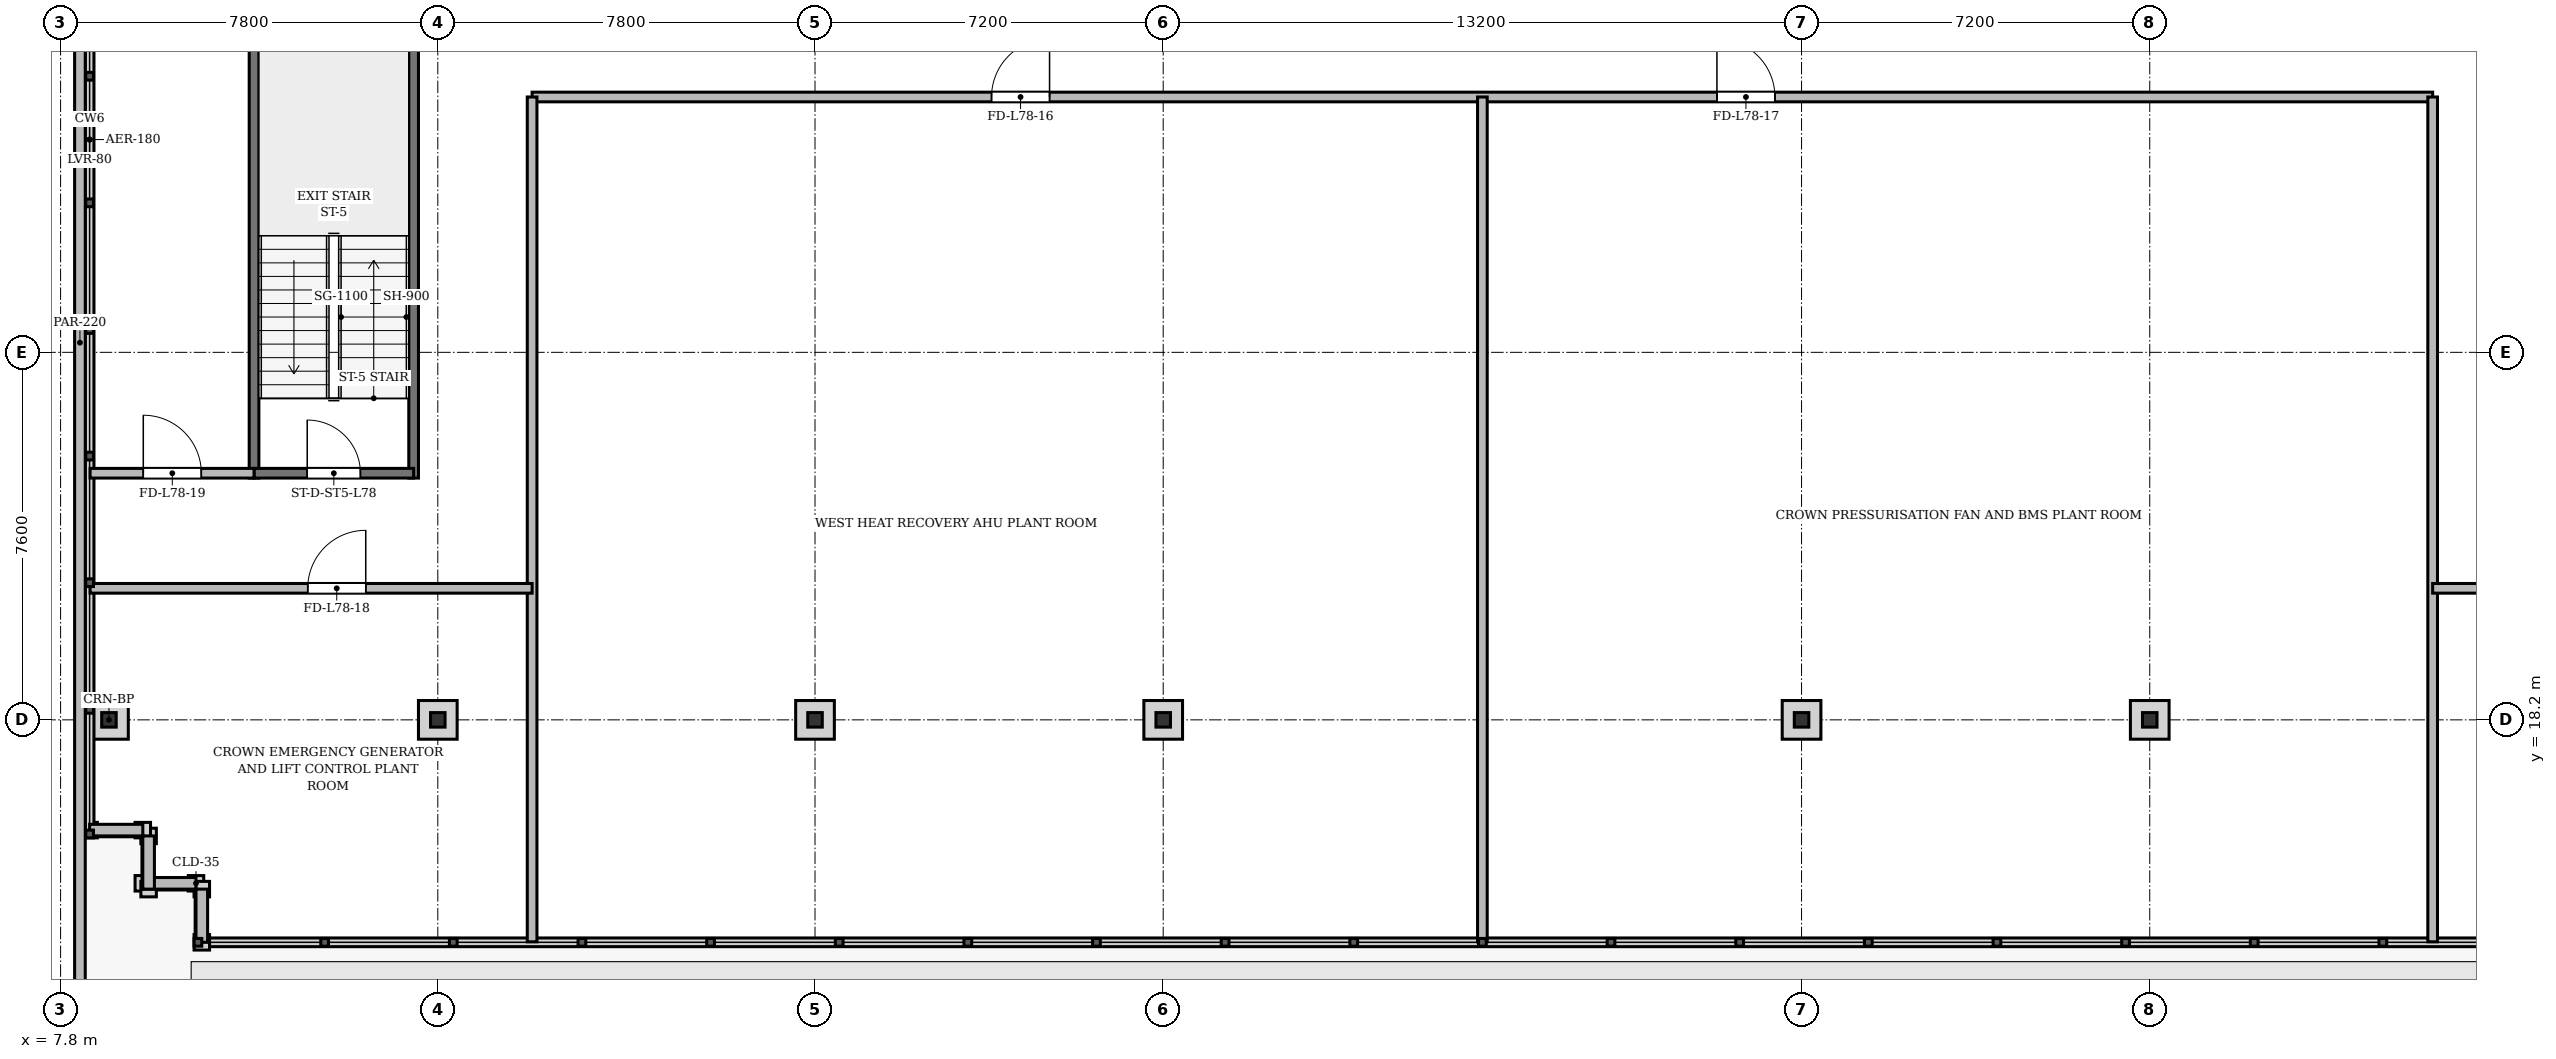
"""IFC4 building model, lengths in metres.
Left out: names, types, materials, properties, quantities, classifications, styles, units other than length and angle.
Written with IfcOpenShell. Run it as: python <this file> out.ifc"""

import sys

from ifc_helpers import new_model, si_unit, direction, frame, frame_2d, origin, origin_2d, place, context, subcontext, project, spatial, rectangle, i_section, extrude, source, transform, mapped, element, fill, save


model = new_model("IFC4")
c1 = context("Model", 3, precision=1e-05, world=origin(), true_north=direction((0.0, 1.0)))
c2 = subcontext(c1, "Body", "Model", "MODEL_VIEW")
j1 = project(units=[si_unit("LENGTHUNIT", "METRE"), si_unit("PLANEANGLEUNIT", "RADIAN")], contexts=[c1])
p1 = place(None, origin())
s1 = spatial("IfcSite", under=j1, at=p1, CompositionType="ELEMENT")
p2 = place(p1, origin())
s2 = spatial("IfcBuilding", under=s1, at=p2, CompositionType="ELEMENT")
p3 = place(p2, frame((0.0, 0.0, 299.1)))
s3 = spatial("IfcBuildingStorey", under=s2, at=p3, CompositionType="ELEMENT", Elevation=299.1)
m1 = source(origin(), c2, "Body", "SweptSolid", [
    extrude(i_section(OverallWidth=0.3, OverallDepth=0.3, WebThickness=0.015, FlangeThickness=0.024, at=origin_2d()), origin(), (0.0, 0.0, 1.0), 4.4),
])
for number, where, z_axis, x_axis in (
    (1, (8.8, 18.2, 0.0), (0.0, 0.0, 1.0), (1.0, 0.0, 0.0)),
    (2, (15.6, 18.2, 0.0), (0.0, 0.0, 1.0), (1.0, 0.0, 0.0)),
    (3, (23.4, 18.2, 0.0), (0.0, 0.0, 1.0), (1.0, 0.0, 0.0)),
    (4, (30.6, 18.2, 0.0), (0.0, 0.0, 1.0), (1.0, 0.0, 0.0)),
    (5, (43.8, 18.2, 0.0), (0.0, 0.0, 1.0), (1.0, 0.0, 0.0)),
    (6, (51.0, 18.2, 0.0), (0.0, 0.0, 1.0), (1.0, 0.0, 0.0)),
):
    element("IfcColumn", number, at=place(p3, frame(where, z_axis=z_axis, x_axis=x_axis)), inside=s3, PredefinedType="COLUMN", context=c2, shape_type="MappedRepresentation", body=[
        mapped(m1, transform((0.0, 0.0, 0.0), x_axis=(1.0, 0.0, 0.0), y_axis=(0.0, 1.0, 0.0), z_axis=(0.0, 0.0, 1.0), scale=1.0)),
    ])
for number, where, z_axis, x_axis in (
    (7, (10.6, 14.82, 0.0), (0.0, 0.0, 1.0), (-1.0, 0.0, 0.0)),
    (8, (9.62, 14.7, 0.0), (0.0, 0.0, 1.0), (0.0, 1.0, 0.0)),
    (9, (9.5, 15.92, 0.0), (0.0, 0.0, 1.0), (-1.0, 0.0, 0.0)),
):
    element("IfcWall", number, at=place(p3, frame(where, z_axis=z_axis, x_axis=x_axis)), inside=s3, PredefinedType="SOLIDWALL", context=c2, shape_type="SweptSolid", body=[
        extrude(rectangle(XDim=1.1, YDim=0.24, at=frame_2d((0.55, 0.0))), origin(), (0.0, 0.0, 1.0), 4.12),
    ])
p4 = place(p3, frame((10.72, 13.6, 0.0), z_axis=(0.0, 0.0, 1.0), x_axis=(0.0, 1.0, 0.0)))
e10 = element("IfcWall", 10, at=p4, inside=s3, PredefinedType="SOLIDWALL", context=c2, shape_type="SweptSolid", body=[
    extrude(rectangle(XDim=1.1, YDim=0.24, at=frame_2d((0.55, 0.0))), origin(), (0.0, 0.0, 1.0), 4.12),
])
p5 = place(p3, frame((8.2, 45.5, 0.0), z_axis=(0.0, 0.0, 1.0), x_axis=(0.0, -1.0, 0.0)))
e11 = element("IfcWall", 11, at=p5, inside=s3, PredefinedType="PARAPET", context=c2, shape_type="SweptSolid", body=[
    extrude(rectangle(XDim=39.0, YDim=0.22, at=frame_2d((19.5, 0.0))), origin(), (0.0, 0.0, 1.0), 1.08),
])
for number, where, z_axis, x_axis in (
    (12, (11.8, 23.2, 0.0), (0.0, 0.0, 1.0), (0.0, 1.0, 0.0)),
    (13, (15.1, 23.2, 0.0), (0.0, 0.0, 1.0), (0.0, 1.0, 0.0)),
):
    element("IfcWall", number, at=place(p3, frame(where, z_axis=z_axis, x_axis=x_axis)), inside=s3, PredefinedType="SHEAR", context=c2, shape_type="SweptSolid", body=[
        extrude(rectangle(XDim=10.0, YDim=0.2, at=frame_2d((5.0, 0.0))), origin(), (0.0, 0.0, 1.0), 4.12),
    ])
p6 = place(p3, frame((11.8, 23.3, 0.0), z_axis=(0.0, 0.0, 1.0), x_axis=(1.0, 0.0, 0.0)))
e14 = element("IfcWall", 14, at=p6, inside=s3, PredefinedType="SHEAR", context=c2, shape_type="SweptSolid", body=[
    extrude(rectangle(XDim=3.3, YDim=0.2, at=frame_2d((1.65, 0.0))), origin(), (0.0, 0.0, 1.0), 4.12),
])
p7 = place(p6, frame((1.1, 0.0, 0.0)))
e15 = element("IfcOpeningElement", 15, at=p7, cuts=e14, PredefinedType="OPENING", context=c2, shape_type="SweptSolid", body=[
    extrude(rectangle(XDim=1.1, YDim=2.15, at=frame_2d((0.55, 1.075))), frame((0.0, 0.11, 0.0), z_axis=(0.0, -1.0, 0.0), x_axis=(1.0, 0.0, 0.0)), (0.0, 0.0, 1.0), 0.22),
])
p8 = place(p3, frame((17.55, 31.08, 0.0), z_axis=(0.0, 0.0, 1.0), x_axis=(1.0, 0.0, 0.0)))
e16 = element("IfcWall", 16, at=p8, inside=s3, PredefinedType="PARTITIONING", context=c2, shape_type="SweptSolid", body=[
    extrude(rectangle(XDim=39.3, YDim=0.2, at=frame_2d((19.65, 0.0))), origin(), (0.0, 0.0, 1.0), 3.62),
])
p9 = place(p8, frame((9.5, 0.0, 0.0)))
e17 = element("IfcOpeningElement", 17, at=p9, cuts=e16, PredefinedType="OPENING", context=c2, shape_type="SweptSolid", body=[
    extrude(rectangle(XDim=1.2, YDim=2.15, at=frame_2d((0.6, 1.075))), frame((0.0, 0.11, 0.0), z_axis=(0.0, -1.0, 0.0), x_axis=(1.0, 0.0, 0.0)), (0.0, 0.0, 1.0), 0.22),
])
p10 = place(p8, frame((24.5, 0.0, 0.0)))
e18 = element("IfcOpeningElement", 18, at=p10, cuts=e16, PredefinedType="OPENING", context=c2, shape_type="SweptSolid", body=[
    extrude(rectangle(XDim=1.2, YDim=2.15, at=frame_2d((0.6, 1.075))), frame((0.0, 0.11, 0.0), z_axis=(0.0, -1.0, 0.0), x_axis=(1.0, 0.0, 0.0)), (0.0, 0.0, 1.0), 0.22),
])
p11 = place(p3, frame((37.2, 13.61, 0.0), z_axis=(0.0, 0.0, 1.0), x_axis=(0.0, 1.0, 0.0)))
e19 = element("IfcWall", 19, at=p11, inside=s3, PredefinedType="PARTITIONING", context=c2, shape_type="SweptSolid", body=[
    extrude(rectangle(XDim=17.47, YDim=0.2, at=frame_2d((8.735, 0.0))), origin(), (0.0, 0.0, 1.0), 4.12),
])
p12 = place(p3, frame((17.55, 13.61, 0.0), z_axis=(0.0, 0.0, 1.0), x_axis=(0.0, 1.0, 0.0)))
e20 = element("IfcWall", 20, at=p12, inside=s3, PredefinedType="PARTITIONING", context=c2, shape_type="SweptSolid", body=[
    extrude(rectangle(XDim=17.47, YDim=0.2, at=frame_2d((8.735, 0.0))), origin(), (0.0, 0.0, 1.0), 3.62),
])
p13 = place(p3, frame((8.41, 20.92, 0.0), z_axis=(0.0, 0.0, 1.0), x_axis=(1.0, 0.0, 0.0)))
e21 = element("IfcWall", 21, at=p13, inside=s3, PredefinedType="PARTITIONING", context=c2, shape_type="SweptSolid", body=[
    extrude(rectangle(XDim=9.14, YDim=0.2, at=frame_2d((4.57, 0.0))), origin(), (0.0, 0.0, 1.0), 3.62),
])
p14 = place(p13, frame((4.5, 0.0, 0.0)))
e22 = element("IfcOpeningElement", 22, at=p14, cuts=e21, PredefinedType="OPENING", context=c2, shape_type="SweptSolid", body=[
    extrude(rectangle(XDim=1.2, YDim=2.15, at=frame_2d((0.6, 1.075))), frame((0.0, 0.11, 0.0), z_axis=(0.0, -1.0, 0.0), x_axis=(1.0, 0.0, 0.0)), (0.0, 0.0, 1.0), 0.22),
])
p15 = place(p3, frame((8.41, 23.3, 0.0), z_axis=(0.0, 0.0, 1.0), x_axis=(1.0, 0.0, 0.0)))
e23 = element("IfcWall", 23, at=p15, inside=s3, PredefinedType="PARTITIONING", context=c2, shape_type="SweptSolid", body=[
    extrude(rectangle(XDim=3.39, YDim=0.2, at=frame_2d((1.695, 0.0))), origin(), (0.0, 0.0, 1.0), 3.62),
])
p16 = place(p15, frame((1.1, 0.0, 0.0)))
e24 = element("IfcOpeningElement", 24, at=p16, cuts=e23, PredefinedType="OPENING", context=c2, shape_type="SweptSolid", body=[
    extrude(rectangle(XDim=1.2, YDim=2.15, at=frame_2d((0.6, 1.075))), frame((0.0, 0.11, 0.0), z_axis=(0.0, -1.0, 0.0), x_axis=(1.0, 0.0, 0.0)), (0.0, 0.0, 1.0), 0.22),
])
p17 = place(p3, frame((56.85, 13.61, 0.0), z_axis=(0.0, 0.0, 1.0), x_axis=(0.0, 1.0, 0.0)))
e25 = element("IfcWall", 25, at=p17, inside=s3, PredefinedType="PARTITIONING", context=c2, shape_type="SweptSolid", body=[
    extrude(rectangle(XDim=17.47, YDim=0.2, at=frame_2d((8.735, 0.0))), origin(), (0.0, 0.0, 1.0), 3.62),
])
p18 = place(p3, frame((56.85, 20.92, 0.0), z_axis=(0.0, 0.0, 1.0), x_axis=(1.0, 0.0, 0.0)))
e26 = element("IfcWall", 26, at=p18, inside=s3, PredefinedType="PARTITIONING", context=c2, shape_type="SweptSolid", body=[
    extrude(rectangle(XDim=9.14, YDim=0.2, at=frame_2d((4.57, 0.0))), origin(), (0.0, 0.0, 1.0), 3.62),
])
p19 = place(p18, frame((3.4, 0.0, 0.0)))
e27 = element("IfcOpeningElement", 27, at=p19, cuts=e26, PredefinedType="OPENING", context=c2, shape_type="SweptSolid", body=[
    extrude(rectangle(XDim=1.2, YDim=2.15, at=frame_2d((0.6, 1.075))), frame((0.0, 0.11, 0.0), z_axis=(0.0, -1.0, 0.0), x_axis=(1.0, 0.0, 0.0)), (0.0, 0.0, 1.0), 0.22),
])
m2 = source(origin(), c2, "Body", "SweptSolid", [
    extrude(rectangle(XDim=1.1, YDim=2.15, at=frame_2d((0.55, 1.075))), frame((0.0, 0.025, 0.0), z_axis=(0.0, -1.0, 0.0), x_axis=(1.0, 0.0, 0.0)), (0.0, 0.0, 1.0), 0.05),
])
p20 = place(p7, origin())
e28 = element("IfcDoor", 28, at=p20, inside=s3, OperationType="SINGLE_SWING_LEFT", PredefinedType="DOOR", context=c2, shape_type="MappedRepresentation", body=[
    mapped(m2, transform((0.0, 0.0, 0.0), x_axis=(1.0, 0.0, 0.0), y_axis=(0.0, 1.0, 0.0), z_axis=(0.0, 0.0, 1.0), scale=1.0)),
])
fill(e15, e28)
m3 = source(origin(), c2, "Body", "SweptSolid", [
    extrude(rectangle(XDim=1.2, YDim=2.15, at=frame_2d((0.6, 1.075))), frame((0.0, 0.025, 0.0), z_axis=(0.0, -1.0, 0.0), x_axis=(1.0, 0.0, 0.0)), (0.0, 0.0, 1.0), 0.05),
])
p21 = place(p9, origin())
e29 = element("IfcDoor", 29, at=p21, inside=s3, OperationType="SINGLE_SWING_RIGHT", PredefinedType="DOOR", context=c2, shape_type="MappedRepresentation", body=[
    mapped(m3, transform((0.0, 0.0, 0.0), x_axis=(1.0, 0.0, 0.0), y_axis=(0.0, 1.0, 0.0), z_axis=(0.0, 0.0, 1.0), scale=1.0)),
])
fill(e17, e29)
p22 = place(p10, origin())
e30 = element("IfcDoor", 30, at=p22, inside=s3, OperationType="SINGLE_SWING_LEFT", PredefinedType="DOOR", context=c2, shape_type="MappedRepresentation", body=[
    mapped(m3, transform((0.0, 0.0, 0.0), x_axis=(1.0, 0.0, 0.0), y_axis=(0.0, 1.0, 0.0), z_axis=(0.0, 0.0, 1.0), scale=1.0)),
])
fill(e18, e30)
p23 = place(p14, origin())
e31 = element("IfcDoor", 31, at=p23, inside=s3, OperationType="SINGLE_SWING_RIGHT", PredefinedType="DOOR", context=c2, shape_type="MappedRepresentation", body=[
    mapped(m3, transform((0.0, 0.0, 0.0), x_axis=(1.0, 0.0, 0.0), y_axis=(0.0, 1.0, 0.0), z_axis=(0.0, 0.0, 1.0), scale=1.0)),
])
fill(e22, e31)
p24 = place(p16, origin())
e32 = element("IfcDoor", 32, at=p24, inside=s3, OperationType="SINGLE_SWING_LEFT", PredefinedType="DOOR", context=c2, shape_type="MappedRepresentation", body=[
    mapped(m3, transform((0.0, 0.0, 0.0), x_axis=(1.0, 0.0, 0.0), y_axis=(0.0, 1.0, 0.0), z_axis=(0.0, 0.0, 1.0), scale=1.0)),
])
fill(e24, e32)
save(model, sys.argv[1])
